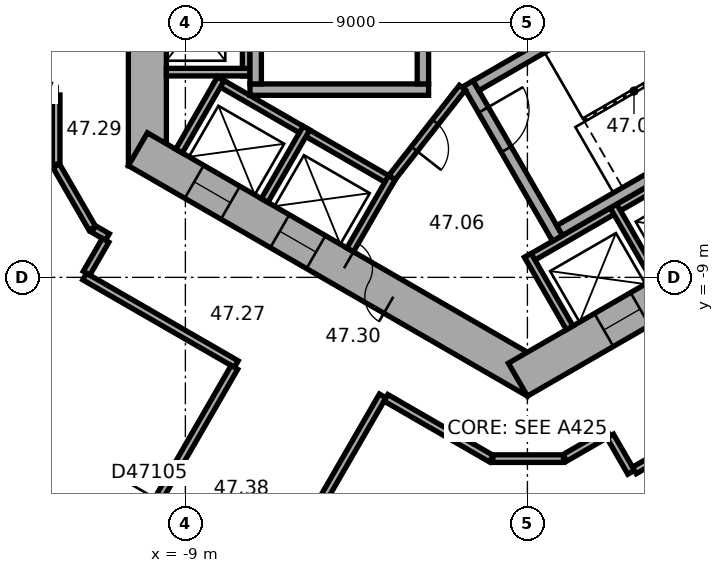
"""IFC4 building model, lengths in metres.
Left out: names, types, materials, properties, quantities, classifications, styles, units other than length and angle.
Written with IfcOpenShell. Run it as: python <this file> out.ifc"""

import sys

from ifc_helpers import new_model, si_unit, direction, frame, frame_2d, origin, place, context, subcontext, project, spatial, rectangle, extrude, element, fill, save


model = new_model("IFC4")
c1 = context("Model", 3, precision=1e-05, world=origin(), true_north=direction((0.0, 1.0)))
c2 = subcontext(c1, "Body", "Model", "MODEL_VIEW")
j1 = project(units=[si_unit("LENGTHUNIT", "METRE"), si_unit("PLANEANGLEUNIT", "RADIAN")], contexts=[c1])
p1 = place(None, origin())
s1 = spatial("IfcSite", under=j1, at=p1, CompositionType="ELEMENT")
p2 = place(p1, origin())
s2 = spatial("IfcBuilding", under=s1, at=p2, CompositionType="ELEMENT")
p3 = place(p2, frame((0.0, 0.0, 191.0)))
s3 = spatial("IfcBuildingStorey", under=s2, at=p3, CompositionType="ELEMENT", Elevation=191.0)
p4 = place(p3, frame((-10.0, 6.062, 0.0), z_axis=(0.0, 0.0, 1.0), x_axis=(0.0, -1.0, 0.0)))
e1 = element("IfcWall", 1, at=p4, inside=s3, PredefinedType="SHEAR", context=c2, shape_type="SweptSolid", body=[
    extrude(rectangle(XDim=12.125, YDim=1.0, at=frame_2d((6.062, 0.0))), origin(), (0.0, 0.0, 1.0), 3.7),
])
p5 = place(p4, frame((5.212, 0.0, 0.0)))
e2 = element("IfcOpeningElement", 2, at=p5, cuts=e1, PredefinedType="OPENING", context=c2, shape_type="SweptSolid", body=[
    extrude(rectangle(XDim=1.1, YDim=2.1, at=frame_2d((0.55, 1.05))), frame((0.0, 0.51, 0.0), z_axis=(0.0, -1.0, 0.0), x_axis=(1.0, 0.0, 0.0)), (0.0, 0.0, 1.0), 1.02),
])
p6 = place(p4, frame((7.812, 0.0, 0.0)))
e3 = element("IfcOpeningElement", 3, at=p6, cuts=e1, PredefinedType="OPENING", context=c2, shape_type="SweptSolid", body=[
    extrude(rectangle(XDim=1.1, YDim=2.1, at=frame_2d((0.55, 1.05))), frame((0.0, 0.51, 0.0), z_axis=(0.0, -1.0, 0.0), x_axis=(1.0, 0.0, 0.0)), (0.0, 0.0, 1.0), 1.02),
])
p7 = place(p3, frame((-10.25, -5.629, 0.0), z_axis=(0.0, 0.0, 1.0), x_axis=(0.866022616891, -0.50000482701, 0.0)))
e4 = element("IfcWall", 4, at=p7, inside=s3, PredefinedType="SHEAR", context=c2, shape_type="SweptSolid", body=[
    extrude(rectangle(XDim=12.125, YDim=1.0, at=frame_2d((6.062, 0.0))), origin(), (0.0, 0.0, 1.0), 3.7),
])
p8 = place(p7, frame((6.262, 0.0, 0.0)))
e5 = element("IfcOpeningElement", 5, at=p8, cuts=e4, PredefinedType="OPENING", context=c2, shape_type="SweptSolid", body=[
    extrude(rectangle(XDim=1.5, YDim=2.1, at=frame_2d((0.75, 1.05))), frame((0.0, 0.51, 0.0), z_axis=(0.0, -1.0, 0.0), x_axis=(1.0, 0.0, 0.0)), (0.0, 0.0, 1.0), 1.02),
])
p9 = place(p7, frame((1.712, 0.0, 0.0)))
e6 = element("IfcOpeningElement", 6, at=p9, cuts=e4, PredefinedType="OPENING", context=c2, shape_type="SweptSolid", body=[
    extrude(rectangle(XDim=1.1, YDim=2.1, at=frame_2d((0.55, 1.05))), frame((0.0, 0.51, 0.0), z_axis=(0.0, -1.0, 0.0), x_axis=(1.0, 0.0, 0.0)), (0.0, 0.0, 1.0), 1.02),
])
p10 = place(p7, frame((4.312, 0.0, 0.0)))
e7 = element("IfcOpeningElement", 7, at=p10, cuts=e4, PredefinedType="OPENING", context=c2, shape_type="SweptSolid", body=[
    extrude(rectangle(XDim=1.1, YDim=2.1, at=frame_2d((0.55, 1.05))), frame((0.0, 0.51, 0.0), z_axis=(0.0, -1.0, 0.0), x_axis=(1.0, 0.0, 0.0)), (0.0, 0.0, 1.0), 1.02),
])
p11 = place(p3, frame((-0.25, -11.691, 0.0), z_axis=(0.0, 0.0, 1.0), x_axis=(0.866022616891, 0.50000482701, 0.0)))
e8 = element("IfcWall", 8, at=p11, inside=s3, PredefinedType="SHEAR", context=c2, shape_type="SweptSolid", body=[
    extrude(rectangle(XDim=12.125, YDim=1.0, at=frame_2d((6.062, 0.0))), origin(), (0.0, 0.0, 1.0), 3.7),
])
p12 = place(p11, frame((2.612, 0.0, 0.0)))
e9 = element("IfcOpeningElement", 9, at=p12, cuts=e8, PredefinedType="OPENING", context=c2, shape_type="SweptSolid", body=[
    extrude(rectangle(XDim=1.1, YDim=2.1, at=frame_2d((0.55, 1.05))), frame((0.0, 0.51, 0.0), z_axis=(0.0, -1.0, 0.0), x_axis=(1.0, 0.0, 0.0)), (0.0, 0.0, 1.0), 1.02),
])
p13 = place(p11, frame((5.212, 0.0, 0.0)))
e10 = element("IfcOpeningElement", 10, at=p13, cuts=e8, PredefinedType="OPENING", context=c2, shape_type="SweptSolid", body=[
    extrude(rectangle(XDim=1.1, YDim=2.1, at=frame_2d((0.55, 1.05))), frame((0.0, 0.51, 0.0), z_axis=(0.0, -1.0, 0.0), x_axis=(1.0, 0.0, 0.0)), (0.0, 0.0, 1.0), 1.02),
])
p14 = place(p11, frame((7.812, 0.0, 0.0)))
e11 = element("IfcOpeningElement", 11, at=p14, cuts=e8, PredefinedType="OPENING", context=c2, shape_type="SweptSolid", body=[
    extrude(rectangle(XDim=1.1, YDim=2.1, at=frame_2d((0.55, 1.05))), frame((0.0, 0.51, 0.0), z_axis=(0.0, -1.0, 0.0), x_axis=(1.0, 0.0, 0.0)), (0.0, 0.0, 1.0), 1.02),
])
p15 = place(p3, frame((-18.789, -14.267, 0.0), z_axis=(0.0, 0.0, 1.0), x_axis=(0.866023315909, -0.500003616288, 0.0)))
e12 = element("IfcWall", 12, at=p15, inside=s3, PredefinedType="STANDARD", context=c2, shape_type="SweptSolid", body=[
    extrude(rectangle(XDim=20.044, YDim=0.2, at=frame_2d((10.022, 0.0))), origin(), (0.0, 0.0, 1.0), 3.7),
])
p16 = place(p15, frame((1.314, 0.0, 0.9)))
e13 = element("IfcOpeningElement", 13, at=p16, cuts=e12, PredefinedType="OPENING", context=c2, shape_type="SweptSolid", body=[
    extrude(rectangle(XDim=2.4, YDim=2.0, at=frame_2d((1.2, 1.0))), frame((0.0, 0.11, 0.0), z_axis=(0.0, -1.0, 0.0), x_axis=(1.0, 0.0, 0.0)), (0.0, 0.0, 1.0), 0.22),
])
p17 = place(p15, frame((5.069, 0.0, 0.9)))
e14 = element("IfcOpeningElement", 14, at=p17, cuts=e12, PredefinedType="OPENING", context=c2, shape_type="SweptSolid", body=[
    extrude(rectangle(XDim=2.4, YDim=2.0, at=frame_2d((1.2, 1.0))), frame((0.0, 0.11, 0.0), z_axis=(0.0, -1.0, 0.0), x_axis=(1.0, 0.0, 0.0)), (0.0, 0.0, 1.0), 0.22),
])
p18 = place(p15, frame((8.823, 0.0, 0.9)))
e15 = element("IfcOpeningElement", 15, at=p18, cuts=e12, PredefinedType="OPENING", context=c2, shape_type="SweptSolid", body=[
    extrude(rectangle(XDim=2.4, YDim=2.0, at=frame_2d((1.2, 1.0))), frame((0.0, 0.11, 0.0), z_axis=(0.0, -1.0, 0.0), x_axis=(1.0, 0.0, 0.0)), (0.0, 0.0, 1.0), 0.22),
])
p19 = place(p15, frame((12.577, 0.0, 0.9)))
e16 = element("IfcOpeningElement", 16, at=p19, cuts=e12, PredefinedType="OPENING", context=c2, shape_type="SweptSolid", body=[
    extrude(rectangle(XDim=2.4, YDim=2.0, at=frame_2d((1.2, 1.0))), frame((0.0, 0.11, 0.0), z_axis=(0.0, -1.0, 0.0), x_axis=(1.0, 0.0, 0.0)), (0.0, 0.0, 1.0), 0.22),
])
p20 = place(p15, frame((16.331, 0.0, 0.9)))
e17 = element("IfcOpeningElement", 17, at=p20, cuts=e12, PredefinedType="OPENING", context=c2, shape_type="SweptSolid", body=[
    extrude(rectangle(XDim=2.4, YDim=2.0, at=frame_2d((1.2, 1.0))), frame((0.0, 0.11, 0.0), z_axis=(0.0, -1.0, 0.0), x_axis=(1.0, 0.0, 0.0)), (0.0, 0.0, 1.0), 0.22),
])
p21 = place(p3, frame((2.911, -24.156, 0.0), z_axis=(0.0, 0.0, 1.0), x_axis=(0.833882163564, 0.551942512668, 0.0)))
e18 = element("IfcWall", 18, at=p21, inside=s3, PredefinedType="STANDARD", context=c2, shape_type="SweptSolid", body=[
    extrude(rectangle(XDim=20.044, YDim=0.2, at=frame_2d((10.022, 0.0))), origin(), (0.0, 0.0, 1.0), 3.7),
])
p22 = place(p21, frame((1.313, 0.0, 0.9)))
e19 = element("IfcOpeningElement", 19, at=p22, cuts=e18, PredefinedType="OPENING", context=c2, shape_type="SweptSolid", body=[
    extrude(rectangle(XDim=2.4, YDim=2.0, at=frame_2d((1.2, 1.0))), frame((0.0, 0.11, 0.0), z_axis=(0.0, -1.0, 0.0), x_axis=(1.0, 0.0, 0.0)), (0.0, 0.0, 1.0), 0.22),
])
p23 = place(p21, frame((5.067, 0.0, 0.9)))
e20 = element("IfcOpeningElement", 20, at=p23, cuts=e18, PredefinedType="OPENING", context=c2, shape_type="SweptSolid", body=[
    extrude(rectangle(XDim=2.4, YDim=2.0, at=frame_2d((1.2, 1.0))), frame((0.0, 0.11, 0.0), z_axis=(0.0, -1.0, 0.0), x_axis=(1.0, 0.0, 0.0)), (0.0, 0.0, 1.0), 0.22),
])
p24 = place(p21, frame((8.821, 0.0, 0.9)))
e21 = element("IfcOpeningElement", 21, at=p24, cuts=e18, PredefinedType="OPENING", context=c2, shape_type="SweptSolid", body=[
    extrude(rectangle(XDim=2.4, YDim=2.0, at=frame_2d((1.2, 1.0))), frame((0.0, 0.11, 0.0), z_axis=(0.0, -1.0, 0.0), x_axis=(1.0, 0.0, 0.0)), (0.0, 0.0, 1.0), 0.22),
])
p25 = place(p21, frame((12.575, 0.0, 0.9)))
e22 = element("IfcOpeningElement", 22, at=p25, cuts=e18, PredefinedType="OPENING", context=c2, shape_type="SweptSolid", body=[
    extrude(rectangle(XDim=2.4, YDim=2.0, at=frame_2d((1.2, 1.0))), frame((0.0, 0.11, 0.0), z_axis=(0.0, -1.0, 0.0), x_axis=(1.0, 0.0, 0.0)), (0.0, 0.0, 1.0), 0.22),
])
p26 = place(p21, frame((16.329, 0.0, 0.9)))
e23 = element("IfcOpeningElement", 23, at=p26, cuts=e18, PredefinedType="OPENING", context=c2, shape_type="SweptSolid", body=[
    extrude(rectangle(XDim=2.4, YDim=2.0, at=frame_2d((1.2, 1.0))), frame((0.0, 0.11, 0.0), z_axis=(0.0, -1.0, 0.0), x_axis=(1.0, 0.0, 0.0)), (0.0, 0.0, 1.0), 0.22),
])
p27 = place(p3, frame((-7.4, 4.3, 0.0), z_axis=(0.0, 0.0, 1.0), x_axis=(0.0, -1.0, 0.0)))
e24 = element("IfcWall", 24, at=p27, inside=s3, PredefinedType="PARTITIONING", context=c2, shape_type="SweptSolid", body=[
    extrude(rectangle(XDim=8.0, YDim=0.2, at=frame_2d((4.0, 0.0))), origin(), (0.0, 0.0, 1.0), 3.42),
])
p28 = place(p3, frame((-7.3, -3.6, 0.0), z_axis=(0.0, 0.0, 1.0), x_axis=(-1.0, 0.0, 0.0)))
e25 = element("IfcWall", 25, at=p28, inside=s3, PredefinedType="PARTITIONING", context=c2, shape_type="SweptSolid", body=[
    extrude(rectangle(XDim=2.2, YDim=0.2, at=frame_2d((1.1, 0.0))), origin(), (0.0, 0.0, 1.0), 3.42),
])
p29 = place(p3, frame((-8.203, -3.809, 0.0), z_axis=(0.0, 0.0, 1.0), x_axis=(0.866028230842, -0.499995103361, 0.0)))
e26 = element("IfcWall", 26, at=p29, inside=s3, PredefinedType="PARTITIONING", context=c2, shape_type="SweptSolid", body=[
    extrude(rectangle(XDim=5.4, YDim=0.2, at=frame_2d((2.7, 0.0))), origin(), (0.0, 0.0, 1.0), 3.42),
])
for number, where, z_axis, x_axis in (
    (27, (-8.067, -3.772, 0.0), (0.0, 0.0, 1.0), (-0.5, -0.866, 0.0)),
    (28, (-5.815, -5.072, 0.0), (0.0, 0.0, 1.0), (-0.5, -0.866, 0.0)),
):
    element("IfcWall", number, at=place(p3, frame(where, z_axis=z_axis, x_axis=x_axis)), inside=s3, PredefinedType="PARTITIONING", context=c2, shape_type="SweptSolid", body=[
        extrude(rectangle(XDim=2.2, YDim=0.2, at=frame_2d((1.1, 0.0))), origin(), (0.0, 0.0, 1.0), 3.42),
    ])
p30 = place(p3, frame((-3.563, -6.372, 0.0), z_axis=(0.0, 0.0, 1.0), x_axis=(-0.499994660107, -0.866028486751, 0.0)))
e29 = element("IfcWall", 29, at=p30, inside=s3, PredefinedType="PARTITIONING", context=c2, shape_type="SweptSolid", body=[
    extrude(rectangle(XDim=2.2, YDim=0.2, at=frame_2d((1.1, 0.0))), origin(), (0.0, 0.0, 1.0), 3.42),
])
p31 = place(p3, frame((-0.024, -8.559, 0.0), z_axis=(0.0, 0.0, 1.0), x_axis=(0.866026010844, 0.49999894854, 0.0)))
e30 = element("IfcWall", 30, at=p31, inside=s3, PredefinedType="PARTITIONING", context=c2, shape_type="SweptSolid", body=[
    extrude(rectangle(XDim=8.0, YDim=0.2, at=frame_2d((4.0, 0.0))), origin(), (0.0, 0.0, 1.0), 3.42),
])
for number, where, z_axis, x_axis in (
    (31, (0.013, -8.422, 0.0), (0.0, 0.0, 1.0), (0.5, -0.866, 0.0)),
    (32, (2.264, -7.122, 0.0), (0.0, 0.0, 1.0), (0.5, -0.866, 0.0)),
):
    element("IfcWall", number, at=place(p3, frame(where, z_axis=z_axis, x_axis=x_axis)), inside=s3, PredefinedType="PARTITIONING", context=c2, shape_type="SweptSolid", body=[
        extrude(rectangle(XDim=2.2, YDim=0.2, at=frame_2d((1.1, 0.0))), origin(), (0.0, 0.0, 1.0), 3.42),
    ])
p32 = place(p3, frame((-2.6, -4.06, 0.0), z_axis=(0.0, 0.0, 1.0), x_axis=(-1.0, 0.0, 0.0)))
e33 = element("IfcWall", 33, at=p32, inside=s3, PredefinedType="SHEAR", context=c2, shape_type="SweptSolid", body=[
    extrude(rectangle(XDim=4.7, YDim=0.3, at=frame_2d((2.35, 0.0))), origin(), (0.0, 0.0, 1.0), 3.42),
])
for number, where, z_axis, x_axis in (
    (34, (-2.75, 3.15, 0.0), (0.0, 0.0, 1.0), (0.0, -1.0, 0.0)),
    (35, (-7.15, 3.15, 0.0), (0.0, 0.0, 1.0), (0.0, -1.0, 0.0)),
):
    element("IfcWall", number, at=place(p3, frame(where, z_axis=z_axis, x_axis=x_axis)), inside=s3, PredefinedType="SHEAR", context=c2, shape_type="SweptSolid", body=[
        extrude(rectangle(XDim=7.06, YDim=0.3, at=frame_2d((3.53, 0.0))), origin(), (0.0, 0.0, 1.0), 3.42),
    ])
p33 = place(p3, frame((-1.558, -3.902, 0.0), z_axis=(0.0, 0.0, 1.0), x_axis=(0.499977259774, -0.866038532462, 0.0)))
e36 = element("IfcWall", 36, at=p33, inside=s3, PredefinedType="SHEAR", context=c2, shape_type="SweptSolid", body=[
    extrude(rectangle(XDim=4.7, YDim=0.3, at=frame_2d((2.35, 0.0))), origin(), (0.0, 0.0, 1.0), 3.42),
])
p34 = place(p33, frame((0.8, 0.0, 0.0)))
e37 = element("IfcOpeningElement", 37, at=p34, cuts=e36, PredefinedType="OPENING", context=c2, shape_type="SweptSolid", body=[
    extrude(rectangle(XDim=1.2, YDim=2.1, at=frame_2d((0.6, 1.05))), frame((0.0, 0.16, 0.0), z_axis=(0.0, -1.0, 0.0), x_axis=(1.0, 0.0, 0.0)), (0.0, 0.0, 1.0), 0.32),
])
for number, where, z_axis, x_axis in (
    (38, (-1.353, -3.957, 0.0), (0.0, 0.0, 1.0), (0.866, 0.5, 0.0)),
    (39, (0.847, -7.767, 0.0), (0.0, 0.0, 1.0), (0.866, 0.5, 0.0)),
):
    element("IfcWall", number, at=place(p3, frame(where, z_axis=z_axis, x_axis=x_axis)), inside=s3, PredefinedType="SHEAR", context=c2, shape_type="SweptSolid", body=[
        extrude(rectangle(XDim=7.06, YDim=0.3, at=frame_2d((3.53, 0.0))), origin(), (0.0, 0.0, 1.0), 3.42),
    ])
p35 = place(p3, frame((-1.712, -4.008, 0.0), z_axis=(0.0, 0.0, 1.0), x_axis=(-0.616549420702, -0.787316208287, 0.0)))
e40 = element("IfcWall", 40, at=p35, inside=s3, PredefinedType="PARTITIONING", context=c2, shape_type="SweptSolid", body=[
    extrude(rectangle(XDim=3.002, YDim=0.2, at=frame_2d((1.501, 0.0))), origin(), (0.0, 0.0, 1.0), 3.42),
])
p36 = place(p35, frame((1.15, 0.0, 0.0)))
e41 = element("IfcOpeningElement", 41, at=p36, cuts=e40, PredefinedType="OPENING", context=c2, shape_type="SweptSolid", body=[
    extrude(rectangle(XDim=0.9, YDim=2.1, at=frame_2d((0.45, 1.05))), frame((0.0, 0.11, 0.0), z_axis=(0.0, -1.0, 0.0), x_axis=(1.0, 0.0, 0.0)), (0.0, 0.0, 1.0), 0.22),
])
p37 = place(p3, frame((-13.601, -4.101, 0.0), z_axis=(0.0, 0.0, 1.0), x_axis=(1.0, 0.0, 0.0)))
e42 = element("IfcWall", 42, at=p37, inside=s3, PredefinedType="PARTITIONING", context=c2, shape_type="SweptSolid", body=[
    extrude(rectangle(XDim=1.201, YDim=0.2, at=frame_2d((0.601, 0.0))), origin(), (0.0, 0.0, 1.0), 3.42),
])
p38 = place(p3, frame((-12.4, -6.062, 0.0), z_axis=(0.0, 0.0, 1.0), x_axis=(0.500022797313, -0.86601224135, 0.0)))
e43 = element("IfcWall", 43, at=p38, inside=s3, PredefinedType="PARTITIONING", context=c2, shape_type="SweptSolid", body=[
    extrude(rectangle(XDim=1.9, YDim=0.2, at=frame_2d((0.95, 0.0))), origin(), (0.0, 0.0, 1.0), 3.42),
])
p39 = place(p3, frame((-12.4, -4.201, 0.0), z_axis=(0.0, 0.0, 1.0), x_axis=(0.0, -1.0, 0.0)))
e44 = element("IfcWall", 44, at=p39, inside=s3, PredefinedType="PARTITIONING", context=c2, shape_type="SweptSolid", body=[
    extrude(rectangle(XDim=1.821, YDim=0.2, at=frame_2d((0.911, 0.0))), origin(), (0.0, 0.0, 1.0), 3.42),
])
p40 = place(p3, frame((-11.651, -8.978, 0.0), z_axis=(0.0, 0.0, 1.0), x_axis=(0.866010893236, -0.500025132165, 0.0)))
e45 = element("IfcWall", 45, at=p40, inside=s3, PredefinedType="PARTITIONING", context=c2, shape_type="SweptSolid", body=[
    extrude(rectangle(XDim=4.608, YDim=0.2, at=frame_2d((2.304, 0.0))), origin(), (0.0, 0.0, 1.0), 3.42),
])
p41 = place(p3, frame((-11.415, -7.728, 0.0), z_axis=(0.0, 0.0, 1.0), x_axis=(0.865915281873, -0.500190688257, 0.0)))
e46 = element("IfcWall", 46, at=p41, inside=s3, PredefinedType="PARTITIONING", context=c2, shape_type="SweptSolid", body=[
    extrude(rectangle(XDim=0.421, YDim=0.2, at=frame_2d((0.21, 0.0))), origin(), (0.0, 0.0, 1.0), 3.42),
])
p42 = place(p3, frame((-11.235, -17.474, 0.0), z_axis=(0.0, 0.0, 1.0), x_axis=(0.500009260695, 0.866020057054, 0.0)))
e47 = element("IfcWall", 47, at=p42, inside=s3, PredefinedType="PARTITIONING", context=c2, shape_type="SweptSolid", body=[
    extrude(rectangle(XDim=7.049, YDim=0.2, at=frame_2d((3.524, 0.0))), origin(), (0.0, 0.0, 1.0), 2.87),
])
p43 = place(p42, frame((3.024, 0.0, 0.0)))
e48 = element("IfcOpeningElement", 48, at=p43, cuts=e47, PredefinedType="OPENING", context=c2, shape_type="SweptSolid", body=[
    extrude(rectangle(XDim=1.0, YDim=2.1, at=frame_2d((0.5, 1.05))), frame((0.0, 0.11, 0.0), z_axis=(0.0, -1.0, 0.0), x_axis=(1.0, 0.0, 0.0)), (0.0, 0.0, 1.0), 0.22),
])
p44 = place(p3, frame((-11.101, -8.025, 0.0), z_axis=(0.0, 0.0, 1.0), x_axis=(-0.500074377092, -0.865982457891, 0.0)))
e49 = element("IfcWall", 49, at=p44, inside=s3, PredefinedType="PARTITIONING", context=c2, shape_type="SweptSolid", body=[
    extrude(rectangle(XDim=1.001, YDim=0.2, at=frame_2d((0.5, 0.0))), origin(), (0.0, 0.0, 1.0), 3.42),
])
p45 = place(p3, frame((-7.984, -19.351, 0.0), z_axis=(0.0, 0.0, 1.0), x_axis=(0.500010139422, 0.866019549707, 0.0)))
e50 = element("IfcWall", 50, at=p45, inside=s3, PredefinedType="PARTITIONING", context=c2, shape_type="SweptSolid", body=[
    extrude(rectangle(XDim=8.35, YDim=0.2, at=frame_2d((4.175, 0.0))), origin(), (0.0, 0.0, 1.0), 3.42),
])
p46 = place(p45, frame((3.675, 0.0, 0.0)))
e51 = element("IfcOpeningElement", 51, at=p46, cuts=e50, PredefinedType="OPENING", context=c2, shape_type="SweptSolid", body=[
    extrude(rectangle(XDim=1.0, YDim=2.1, at=frame_2d((0.5, 1.05))), frame((0.0, 0.11, 0.0), z_axis=(0.0, -1.0, 0.0), x_axis=(1.0, 0.0, 0.0)), (0.0, 0.0, 1.0), 0.22),
])
p47 = place(p3, frame((-3.722, -12.169, 0.0), z_axis=(0.0, 0.0, 1.0), x_axis=(0.866033163891, -0.499986558861, 0.0)))
e52 = element("IfcWall", 52, at=p47, inside=s3, PredefinedType="PARTITIONING", context=c2, shape_type="SweptSolid", body=[
    extrude(rectangle(XDim=3.201, YDim=0.2, at=frame_2d((1.6, 0.0))), origin(), (0.0, 0.0, 1.0), 3.42),
])
p48 = place(p3, frame((-0.91, -13.77, 0.0), z_axis=(0.0, 0.0, 1.0), x_axis=(1.0, 0.0, 0.0)))
e53 = element("IfcWall", 53, at=p48, inside=s3, PredefinedType="PARTITIONING", context=c2, shape_type="SweptSolid", body=[
    extrude(rectangle(XDim=1.86, YDim=0.2, at=frame_2d((0.93, 0.0))), origin(), (0.0, 0.0, 1.0), 3.42),
])
p49 = place(p3, frame((0.985, -13.75, 0.0), z_axis=(0.0, 0.0, 1.0), x_axis=(0.866028661061, 0.499994358189, 0.0)))
e54 = element("IfcWall", 54, at=p49, inside=s3, PredefinedType="PARTITIONING", context=c2, shape_type="SweptSolid", body=[
    extrude(rectangle(XDim=1.321, YDim=0.2, at=frame_2d((0.661, 0.0))), origin(), (0.0, 0.0, 1.0), 3.42),
])
p50 = place(p3, frame((2.179, -13.176, 0.0), z_axis=(0.0, 0.0, 1.0), x_axis=(0.499978356969, -0.866037899034, 0.0)))
e55 = element("IfcWall", 55, at=p50, inside=s3, PredefinedType="PARTITIONING", context=c2, shape_type="SweptSolid", body=[
    extrude(rectangle(XDim=1.101, YDim=0.2, at=frame_2d((0.551, 0.0))), origin(), (0.0, 0.0, 1.0), 3.42),
])
p51 = place(p3, frame((2.816, -14.079, 0.0), z_axis=(0.0, 0.0, 1.0), x_axis=(0.866021128829, 0.500007404367, 0.0)))
e56 = element("IfcWall", 56, at=p51, inside=s3, PredefinedType="PARTITIONING", context=c2, shape_type="SweptSolid", body=[
    extrude(rectangle(XDim=8.702, YDim=0.2, at=frame_2d((4.351, 0.0))), origin(), (0.0, 0.0, 1.0), 3.42),
])
p52 = place(p51, frame((5.184, 0.0, 0.0)))
e57 = element("IfcOpeningElement", 57, at=p52, cuts=e56, PredefinedType="OPENING", context=c2, shape_type="SweptSolid", body=[
    extrude(rectangle(XDim=1.0, YDim=2.1, at=frame_2d((0.5, 1.05))), frame((0.0, 0.11, 0.0), z_axis=(0.0, -1.0, 0.0), x_axis=(1.0, 0.0, 0.0)), (0.0, 0.0, 1.0), 0.22),
])
p53 = place(p8, origin())
e58 = element("IfcDoor", 58, at=p53, inside=s3, OperationType="DOUBLE_DOOR_SINGLE_SWING", PredefinedType="DOOR", context=c2, shape_type="SweptSolid", body=[
    extrude(rectangle(XDim=1.5, YDim=2.1, at=frame_2d((0.75, 1.05))), frame((0.0, 0.025, 0.0), z_axis=(0.0, -1.0, 0.0), x_axis=(1.0, 0.0, 0.0)), (0.0, 0.0, 1.0), 0.05),
])
fill(e5, e58)
p54 = place(p34, origin())
e59 = element("IfcDoor", 59, at=p54, inside=s3, OperationType="SINGLE_SWING_RIGHT", PredefinedType="DOOR", context=c2, shape_type="SweptSolid", body=[
    extrude(rectangle(XDim=1.2, YDim=2.1, at=frame_2d((0.6, 1.05))), frame((0.0, 0.025, 0.0), z_axis=(0.0, -1.0, 0.0), x_axis=(1.0, 0.0, 0.0)), (0.0, 0.0, 1.0), 0.05),
])
fill(e37, e59)
p55 = place(p36, origin())
e60 = element("IfcDoor", 60, at=p55, inside=s3, OperationType="SINGLE_SWING_LEFT", PredefinedType="DOOR", context=c2, shape_type="SweptSolid", body=[
    extrude(rectangle(XDim=0.9, YDim=2.1, at=frame_2d((0.45, 1.05))), frame((0.0, 0.025, 0.0), z_axis=(0.0, -1.0, 0.0), x_axis=(1.0, 0.0, 0.0)), (0.0, 0.0, 1.0), 0.05),
])
fill(e41, e60)
p56 = place(p9, origin())
e61 = element("IfcDoor", 61, at=p56, inside=s3, OperationType="DOUBLE_DOOR_SLIDING", PredefinedType="DOOR", context=c2, shape_type="SweptSolid", body=[
    extrude(rectangle(XDim=1.1, YDim=2.1, at=frame_2d((0.55, 1.05))), frame((0.0, 0.025, 0.0), z_axis=(0.0, -1.0, 0.0), x_axis=(1.0, 0.0, 0.0)), (0.0, 0.0, 1.0), 0.05),
])
fill(e6, e61)
p57 = place(p10, origin())
e62 = element("IfcDoor", 62, at=p57, inside=s3, OperationType="DOUBLE_DOOR_SLIDING", PredefinedType="DOOR", context=c2, shape_type="SweptSolid", body=[
    extrude(rectangle(XDim=1.1, YDim=2.1, at=frame_2d((0.55, 1.05))), frame((0.0, 0.025, 0.0), z_axis=(0.0, -1.0, 0.0), x_axis=(1.0, 0.0, 0.0)), (0.0, 0.0, 1.0), 0.05),
])
fill(e7, e62)
p58 = place(p12, origin())
e63 = element("IfcDoor", 63, at=p58, inside=s3, OperationType="DOUBLE_DOOR_SLIDING", PredefinedType="DOOR", context=c2, shape_type="SweptSolid", body=[
    extrude(rectangle(XDim=1.1, YDim=2.1, at=frame_2d((0.55, 1.05))), frame((0.0, 0.025, 0.0), z_axis=(0.0, -1.0, 0.0), x_axis=(1.0, 0.0, 0.0)), (0.0, 0.0, 1.0), 0.05),
])
fill(e9, e63)
p59 = place(p43, origin())
e64 = element("IfcDoor", 64, at=p59, inside=s3, OperationType="SINGLE_SWING_LEFT", PredefinedType="DOOR", context=c2, shape_type="SweptSolid", body=[
    extrude(rectangle(XDim=1.0, YDim=2.1, at=frame_2d((0.5, 1.05))), frame((0.0, 0.025, 0.0), z_axis=(0.0, -1.0, 0.0), x_axis=(1.0, 0.0, 0.0)), (0.0, 0.0, 1.0), 0.05),
])
fill(e48, e64)
save(model, sys.argv[1])
